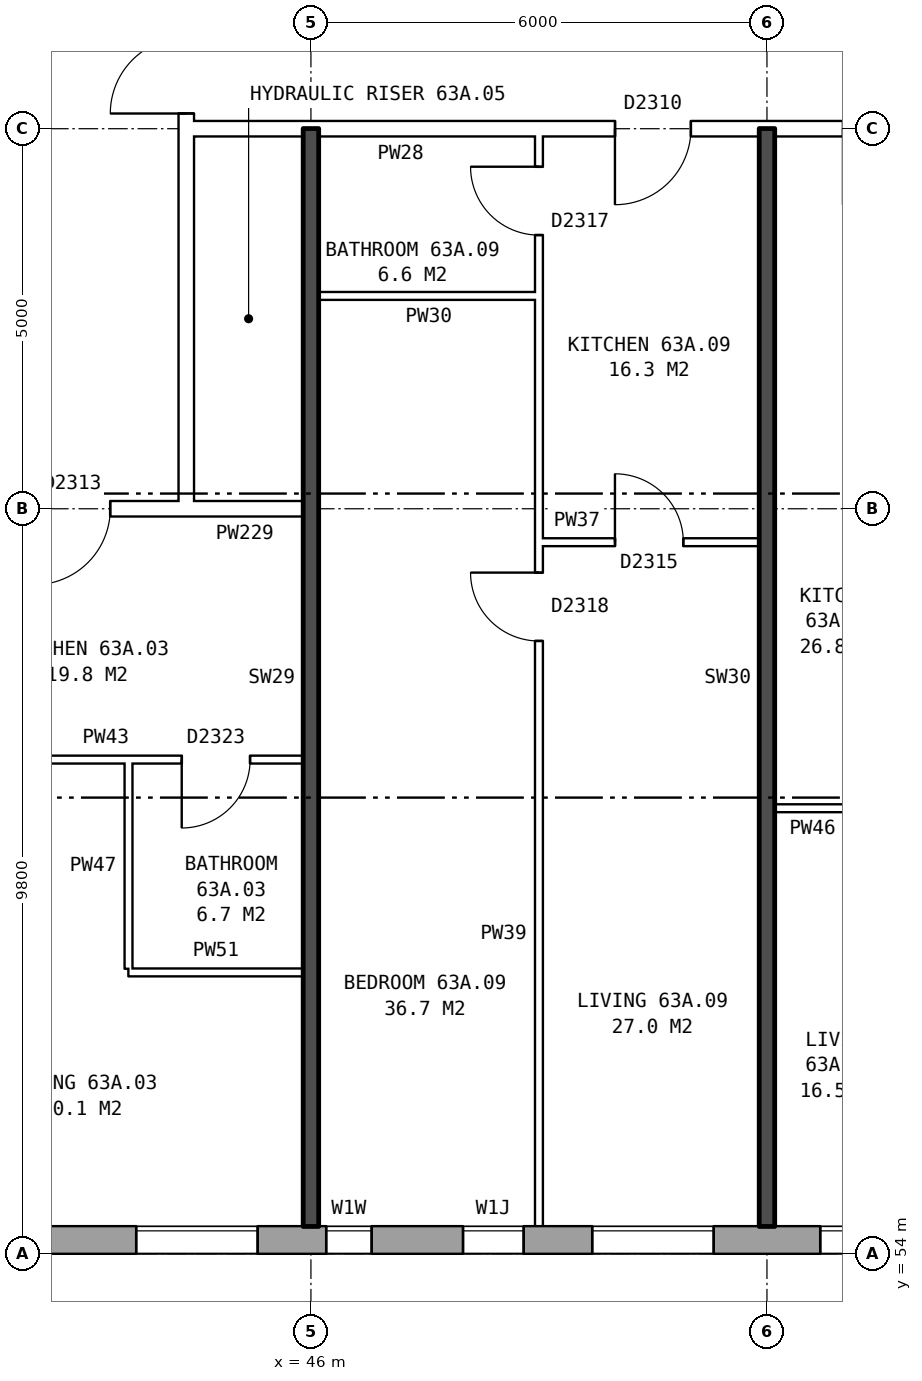
"""IFC4 building model, lengths in metres.
Left out: names, types, materials, properties, quantities, classifications, styles, units other than length and angle.
Written with IfcOpenShell. Run it as: python <this file> out.ifc"""

import sys

from ifc_helpers import new_model, si_unit, direction, frame, frame_2d, origin, place, context, subcontext, project, spatial, rectangle, extrude, element, fill, save


model = new_model("IFC4")
c1 = context("Model", 3, precision=1e-05, world=origin(), true_north=direction((0.0, 1.0)))
c2 = subcontext(c1, "Body", "Model", "MODEL_VIEW")
j1 = project(units=[si_unit("LENGTHUNIT", "METRE"), si_unit("PLANEANGLEUNIT", "RADIAN")], contexts=[c1])
p1 = place(None, origin())
s1 = spatial("IfcSite", under=j1, at=p1, CompositionType="ELEMENT")
p2 = place(p1, origin())
s2 = spatial("IfcBuilding", under=s1, at=p2, CompositionType="ELEMENT")
p3 = place(p2, frame((0.0, 0.0, 224.5)))
s3 = spatial("IfcBuildingStorey", under=s2, at=p3, CompositionType="ELEMENT", Elevation=224.5)
p4 = place(p3, frame((35.075, 54.18, 0.0), z_axis=(0.0, 0.0, 1.0), x_axis=(1.0, 0.0, 0.0)))
e1 = element("IfcWall", 1, at=p4, inside=s3, PredefinedType="STANDARD", context=c2, shape_type="SweptSolid", body=[
    extrude(rectangle(XDim=39.875, YDim=0.36, at=frame_2d((19.938, 0.0))), origin(), (0.0, 0.0, 1.0), 2.85),
])
p5 = place(p4, frame((2.625, 0.0, 0.8)))
e2 = element("IfcOpeningElement", 2, at=p5, cuts=e1, PredefinedType="OPENING", context=c2, shape_type="SweptSolid", body=[
    extrude(rectangle(XDim=1.6, YDim=1.8, at=frame_2d((0.8, 0.9))), frame((0.0, 0.19, 0.0), z_axis=(0.0, -1.0, 0.0), x_axis=(1.0, 0.0, 0.0)), (0.0, 0.0, 1.0), 0.38),
])
p6 = place(p4, frame((5.625, 0.0, 0.8)))
e3 = element("IfcOpeningElement", 3, at=p6, cuts=e1, PredefinedType="OPENING", context=c2, shape_type="SweptSolid", body=[
    extrude(rectangle(XDim=1.6, YDim=1.8, at=frame_2d((0.8, 0.9))), frame((0.0, 0.19, 0.0), z_axis=(0.0, -1.0, 0.0), x_axis=(1.0, 0.0, 0.0)), (0.0, 0.0, 1.0), 0.38),
])
p7 = place(p4, frame((8.625, 0.0, 0.8)))
e4 = element("IfcOpeningElement", 4, at=p7, cuts=e1, PredefinedType="OPENING", context=c2, shape_type="SweptSolid", body=[
    extrude(rectangle(XDim=1.6, YDim=1.8, at=frame_2d((0.8, 0.9))), frame((0.0, 0.19, 0.0), z_axis=(0.0, -1.0, 0.0), x_axis=(1.0, 0.0, 0.0)), (0.0, 0.0, 1.0), 0.38),
])
p8 = place(p4, frame((11.125, 0.0, 1.65)))
e5 = element("IfcOpeningElement", 5, at=p8, cuts=e1, PredefinedType="OPENING", context=c2, shape_type="SweptSolid", body=[
    extrude(rectangle(XDim=0.6, YDim=0.9, at=frame_2d((0.3, 0.45))), frame((0.0, 0.19, 0.0), z_axis=(0.0, -1.0, 0.0), x_axis=(1.0, 0.0, 0.0)), (0.0, 0.0, 1.0), 0.38),
])
p9 = place(p4, frame((14.625, 0.0, 0.8)))
e6 = element("IfcOpeningElement", 6, at=p9, cuts=e1, PredefinedType="OPENING", context=c2, shape_type="SweptSolid", body=[
    extrude(rectangle(XDim=1.6, YDim=1.8, at=frame_2d((0.8, 0.9))), frame((0.0, 0.19, 0.0), z_axis=(0.0, -1.0, 0.0), x_axis=(1.0, 0.0, 0.0)), (0.0, 0.0, 1.0), 0.38),
])
p10 = place(p4, frame((17.625, 0.0, 0.8)))
e7 = element("IfcOpeningElement", 7, at=p10, cuts=e1, PredefinedType="OPENING", context=c2, shape_type="SweptSolid", body=[
    extrude(rectangle(XDim=1.6, YDim=1.8, at=frame_2d((0.8, 0.9))), frame((0.0, 0.19, 0.0), z_axis=(0.0, -1.0, 0.0), x_axis=(1.0, 0.0, 0.0)), (0.0, 0.0, 1.0), 0.38),
])
p11 = place(p4, frame((20.625, 0.0, 0.8)))
e8 = element("IfcOpeningElement", 8, at=p11, cuts=e1, PredefinedType="OPENING", context=c2, shape_type="SweptSolid", body=[
    extrude(rectangle(XDim=1.6, YDim=1.8, at=frame_2d((0.8, 0.9))), frame((0.0, 0.19, 0.0), z_axis=(0.0, -1.0, 0.0), x_axis=(1.0, 0.0, 0.0)), (0.0, 0.0, 1.0), 0.38),
])
p12 = place(p4, frame((23.125, 0.0, 0.75)))
e9 = element("IfcOpeningElement", 9, at=p12, cuts=e1, PredefinedType="OPENING", context=c2, shape_type="SweptSolid", body=[
    extrude(rectangle(XDim=1.2, YDim=1.8, at=frame_2d((0.6, 0.9))), frame((0.0, 0.19, 0.0), z_axis=(0.0, -1.0, 0.0), x_axis=(1.0, 0.0, 0.0)), (0.0, 0.0, 1.0), 0.38),
])
p13 = place(p4, frame((26.625, 0.0, 0.8)))
e10 = element("IfcOpeningElement", 10, at=p13, cuts=e1, PredefinedType="OPENING", context=c2, shape_type="SweptSolid", body=[
    extrude(rectangle(XDim=1.6, YDim=1.8, at=frame_2d((0.8, 0.9))), frame((0.0, 0.19, 0.0), z_axis=(0.0, -1.0, 0.0), x_axis=(1.0, 0.0, 0.0)), (0.0, 0.0, 1.0), 0.38),
])
p14 = place(p4, frame((29.625, 0.0, 0.8)))
e11 = element("IfcOpeningElement", 11, at=p14, cuts=e1, PredefinedType="OPENING", context=c2, shape_type="SweptSolid", body=[
    extrude(rectangle(XDim=1.6, YDim=1.8, at=frame_2d((0.8, 0.9))), frame((0.0, 0.19, 0.0), z_axis=(0.0, -1.0, 0.0), x_axis=(1.0, 0.0, 0.0)), (0.0, 0.0, 1.0), 0.38),
])
p15 = place(p4, frame((32.625, 0.0, 0.8)))
e12 = element("IfcOpeningElement", 12, at=p15, cuts=e1, PredefinedType="OPENING", context=c2, shape_type="SweptSolid", body=[
    extrude(rectangle(XDim=1.6, YDim=1.8, at=frame_2d((0.8, 0.9))), frame((0.0, 0.19, 0.0), z_axis=(0.0, -1.0, 0.0), x_axis=(1.0, 0.0, 0.0)), (0.0, 0.0, 1.0), 0.38),
])
p16 = place(p4, frame((35.625, 0.0, 0.8)))
e13 = element("IfcOpeningElement", 13, at=p16, cuts=e1, PredefinedType="OPENING", context=c2, shape_type="SweptSolid", body=[
    extrude(rectangle(XDim=1.6, YDim=1.8, at=frame_2d((0.8, 0.9))), frame((0.0, 0.19, 0.0), z_axis=(0.0, -1.0, 0.0), x_axis=(1.0, 0.0, 0.0)), (0.0, 0.0, 1.0), 0.38),
])
p17 = place(p4, frame((12.925, 0.0, 0.15)))
e14 = element("IfcOpeningElement", 14, at=p17, cuts=e1, PredefinedType="OPENING", context=c2, shape_type="SweptSolid", body=[
    extrude(rectangle(XDim=0.8, YDim=1.5, at=frame_2d((0.4, 0.75))), frame((0.0, 0.19, 0.0), z_axis=(0.0, -1.0, 0.0), x_axis=(1.0, 0.0, 0.0)), (0.0, 0.0, 1.0), 0.38),
])
p18 = place(p4, frame((24.625, 0.0, 0.25)))
e15 = element("IfcOpeningElement", 15, at=p18, cuts=e1, PredefinedType="OPENING", context=c2, shape_type="SweptSolid", body=[
    extrude(rectangle(XDim=0.6, YDim=0.9, at=frame_2d((0.3, 0.45))), frame((0.0, 0.19, 0.0), z_axis=(0.0, -1.0, 0.0), x_axis=(1.0, 0.0, 0.0)), (0.0, 0.0, 1.0), 0.38),
])
p19 = place(p3, frame((44.36, 63.9, 0.0), z_axis=(0.0, 0.0, 1.0), x_axis=(0.0, 1.0, 0.0)))
e16 = element("IfcWall", 16, at=p19, inside=s3, PredefinedType="PARTITIONING", context=c2, shape_type="SweptSolid", body=[
    extrude(rectangle(XDim=12.2, YDim=0.2, at=frame_2d((6.1, 0.0))), origin(), (0.0, 0.0, 1.0), 2.85),
])
p20 = place(p19, frame((5.1, 0.0, 0.0)))
e17 = element("IfcOpeningElement", 17, at=p20, cuts=e16, PredefinedType="OPENING", context=c2, shape_type="SweptSolid", body=[
    extrude(rectangle(XDim=2.0, YDim=2.1, at=frame_2d((1.0, 1.05))), frame((0.0, 0.11, 0.0), z_axis=(0.0, -1.0, 0.0), x_axis=(1.0, 0.0, 0.0)), (0.0, 0.0, 1.0), 0.22),
])
p21 = place(p3, frame((43.6, 57.7, 0.0), z_axis=(0.0, 0.0, 1.0), x_axis=(1.0, 0.0, 0.0)))
e18 = element("IfcWall", 18, at=p21, inside=s3, PredefinedType="PARTITIONING", context=c2, shape_type="SweptSolid", body=[
    extrude(rectangle(XDim=2.3, YDim=0.1, at=frame_2d((1.15, 0.0))), origin(), (0.0, 0.0, 1.0), 2.85),
])
p22 = place(p3, frame((52.1, 59.86, 0.0), z_axis=(0.0, 0.0, 1.0), x_axis=(1.0, 0.0, 0.0)))
e19 = element("IfcWall", 19, at=p22, inside=s3, PredefinedType="PARTITIONING", context=c2, shape_type="SweptSolid", body=[
    extrude(rectangle(XDim=2.9, YDim=0.1, at=frame_2d((1.45, 0.0))), origin(), (0.0, 0.0, 1.0), 2.85),
])
p23 = place(p22, frame((1.0, 0.0, 0.0)))
e20 = element("IfcOpeningElement", 20, at=p23, cuts=e19, PredefinedType="OPENING", context=c2, shape_type="SweptSolid", body=[
    extrude(rectangle(XDim=0.9, YDim=2.1, at=frame_2d((0.45, 1.05))), frame((0.0, 0.06, 0.0), z_axis=(0.0, -1.0, 0.0), x_axis=(1.0, 0.0, 0.0)), (0.0, 0.0, 1.0), 0.12),
])
p24 = place(p3, frame((40.1, 60.5, 0.0), z_axis=(0.0, 0.0, 1.0), x_axis=(1.0, 0.0, 0.0)))
e21 = element("IfcWall", 21, at=p24, inside=s3, PredefinedType="PARTITIONING", context=c2, shape_type="SweptSolid", body=[
    extrude(rectangle(XDim=5.8, YDim=0.1, at=frame_2d((2.9, 0.0))), origin(), (0.0, 0.0, 1.0), 2.85),
])
p25 = place(p24, frame((1.3, 0.0, 0.0)))
e22 = element("IfcOpeningElement", 22, at=p25, cuts=e21, PredefinedType="OPENING", context=c2, shape_type="SweptSolid", body=[
    extrude(rectangle(XDim=0.9, YDim=2.1, at=frame_2d((0.45, 1.05))), frame((0.0, 0.06, 0.0), z_axis=(0.0, -1.0, 0.0), x_axis=(1.0, 0.0, 0.0)), (0.0, 0.0, 1.0), 0.12),
])
p26 = place(p24, frame((4.2, 0.0, 0.0)))
e23 = element("IfcOpeningElement", 23, at=p26, cuts=e21, PredefinedType="OPENING", context=c2, shape_type="SweptSolid", body=[
    extrude(rectangle(XDim=0.9, YDim=2.1, at=frame_2d((0.45, 1.05))), frame((0.0, 0.06, 0.0), z_axis=(0.0, -1.0, 0.0), x_axis=(1.0, 0.0, 0.0)), (0.0, 0.0, 1.0), 0.12),
])
p27 = place(p3, frame((49.0, 63.36, 0.0), z_axis=(0.0, 0.0, 1.0), x_axis=(1.0, 0.0, 0.0)))
e24 = element("IfcWall", 24, at=p27, inside=s3, PredefinedType="PARTITIONING", context=c2, shape_type="SweptSolid", body=[
    extrude(rectangle(XDim=2.9, YDim=0.1, at=frame_2d((1.45, 0.0))), origin(), (0.0, 0.0, 1.0), 2.85),
])
p28 = place(p27, frame((1.0, 0.0, 0.0)))
e25 = element("IfcOpeningElement", 25, at=p28, cuts=e24, PredefinedType="OPENING", context=c2, shape_type="SweptSolid", body=[
    extrude(rectangle(XDim=0.9, YDim=2.1, at=frame_2d((0.45, 1.05))), frame((0.0, 0.06, 0.0), z_axis=(0.0, -1.0, 0.0), x_axis=(1.0, 0.0, 0.0)), (0.0, 0.0, 1.0), 0.12),
])
p29 = place(p3, frame((41.36, 63.8, 0.0), z_axis=(0.0, 0.0, 1.0), x_axis=(1.0, 0.0, 0.0)))
e26 = element("IfcWall", 26, at=p29, inside=s3, PredefinedType="PARTITIONING", context=c2, shape_type="SweptSolid", body=[
    extrude(rectangle(XDim=3.0, YDim=0.2, at=frame_2d((1.5, 0.0))), origin(), (0.0, 0.0, 1.0), 2.85),
])
p30 = place(p29, frame((1.0, 0.0, 0.0)))
e27 = element("IfcOpeningElement", 27, at=p30, cuts=e26, PredefinedType="OPENING", context=c2, shape_type="SweptSolid", body=[
    extrude(rectangle(XDim=1.0, YDim=2.1, at=frame_2d((0.5, 1.05))), frame((0.0, 0.11, 0.0), z_axis=(0.0, -1.0, 0.0), x_axis=(1.0, 0.0, 0.0)), (0.0, 0.0, 1.0), 0.22),
])
p31 = place(p3, frame((44.36, 63.8, 0.0), z_axis=(0.0, 0.0, 1.0), x_axis=(1.0, 0.0, 0.0)))
e28 = element("IfcWall", 28, at=p31, inside=s3, PredefinedType="PARTITIONING", context=c2, shape_type="SweptSolid", body=[
    extrude(rectangle(XDim=1.54, YDim=0.2, at=frame_2d((0.77, 0.0))), origin(), (0.0, 0.0, 1.0), 2.85),
])
p32 = place(p3, frame((46.1, 66.6, 0.0), z_axis=(0.0, 0.0, 1.0), x_axis=(1.0, 0.0, 0.0)))
e29 = element("IfcWall", 29, at=p32, inside=s3, PredefinedType="PARTITIONING", context=c2, shape_type="SweptSolid", body=[
    extrude(rectangle(XDim=2.9, YDim=0.1, at=frame_2d((1.45, 0.0))), origin(), (0.0, 0.0, 1.0), 2.85),
])
p33 = place(p3, frame((44.36, 68.8, 0.0), z_axis=(0.0, 0.0, 1.0), x_axis=(1.0, 0.0, 0.0)))
e30 = element("IfcWall", 30, at=p33, inside=s3, PredefinedType="PARTITIONING", context=c2, shape_type="SweptSolid", body=[
    extrude(rectangle(XDim=19.28, YDim=0.2, at=frame_2d((9.64, 0.0))), origin(), (0.0, 0.0, 1.0), 2.85),
])
p34 = place(p33, frame((14.64, 0.0, 0.0)))
e31 = element("IfcOpeningElement", 31, at=p34, cuts=e30, PredefinedType="OPENING", context=c2, shape_type="SweptSolid", body=[
    extrude(rectangle(XDim=1.0, YDim=2.1, at=frame_2d((0.5, 1.05))), frame((0.0, 0.11, 0.0), z_axis=(0.0, -1.0, 0.0), x_axis=(1.0, 0.0, 0.0)), (0.0, 0.0, 1.0), 0.22),
])
p35 = place(p33, frame((8.64, 0.0, 0.0)))
e32 = element("IfcOpeningElement", 32, at=p35, cuts=e30, PredefinedType="OPENING", context=c2, shape_type="SweptSolid", body=[
    extrude(rectangle(XDim=1.0, YDim=2.1, at=frame_2d((0.5, 1.05))), frame((0.0, 0.11, 0.0), z_axis=(0.0, -1.0, 0.0), x_axis=(1.0, 0.0, 0.0)), (0.0, 0.0, 1.0), 0.22),
])
p36 = place(p33, frame((5.64, 0.0, 0.0)))
e33 = element("IfcOpeningElement", 33, at=p36, cuts=e30, PredefinedType="OPENING", context=c2, shape_type="SweptSolid", body=[
    extrude(rectangle(XDim=1.0, YDim=2.1, at=frame_2d((0.5, 1.05))), frame((0.0, 0.11, 0.0), z_axis=(0.0, -1.0, 0.0), x_axis=(1.0, 0.0, 0.0)), (0.0, 0.0, 1.0), 0.22),
])
p37 = place(p3, frame((43.6, 57.75, 0.0), z_axis=(0.0, 0.0, 1.0), x_axis=(0.0, 1.0, 0.0)))
e34 = element("IfcWall", 34, at=p37, inside=s3, PredefinedType="PARTITIONING", context=c2, shape_type="SweptSolid", body=[
    extrude(rectangle(XDim=2.7, YDim=0.1, at=frame_2d((1.35, 0.0))), origin(), (0.0, 0.0, 1.0), 2.85),
])
p38 = place(p3, frame((46.0, 54.36, 0.0), z_axis=(0.0, 0.0, 1.0), x_axis=(0.0, 1.0, 0.0)))
e35 = element("IfcWall", 35, at=p38, inside=s3, PredefinedType="SOLIDWALL", context=c2, shape_type="SweptSolid", body=[
    extrude(rectangle(XDim=14.44, YDim=0.2, at=frame_2d((7.22, 0.0))), origin(), (0.0, 0.0, 1.0), 2.85),
])
p39 = place(p3, frame((49.0, 54.36, 0.0), z_axis=(0.0, 0.0, 1.0), x_axis=(0.0, 1.0, 0.0)))
e36 = element("IfcWall", 36, at=p39, inside=s3, PredefinedType="PARTITIONING", context=c2, shape_type="SweptSolid", body=[
    extrude(rectangle(XDim=14.34, YDim=0.1, at=frame_2d((7.17, 0.0))), origin(), (0.0, 0.0, 1.0), 2.85),
])
p40 = place(p39, frame((7.7, 0.0, 0.0)))
e37 = element("IfcOpeningElement", 37, at=p40, cuts=e36, PredefinedType="OPENING", context=c2, shape_type="SweptSolid", body=[
    extrude(rectangle(XDim=0.9, YDim=2.1, at=frame_2d((0.45, 1.05))), frame((0.0, 0.06, 0.0), z_axis=(0.0, -1.0, 0.0), x_axis=(1.0, 0.0, 0.0)), (0.0, 0.0, 1.0), 0.12),
])
p41 = place(p39, frame((13.04, 0.0, 0.0)))
e38 = element("IfcOpeningElement", 38, at=p41, cuts=e36, PredefinedType="OPENING", context=c2, shape_type="SweptSolid", body=[
    extrude(rectangle(XDim=0.9, YDim=2.1, at=frame_2d((0.45, 1.05))), frame((0.0, 0.06, 0.0), z_axis=(0.0, -1.0, 0.0), x_axis=(1.0, 0.0, 0.0)), (0.0, 0.0, 1.0), 0.12),
])
p42 = place(p3, frame((52.0, 54.36, 0.0), z_axis=(0.0, 0.0, 1.0), x_axis=(0.0, 1.0, 0.0)))
e39 = element("IfcWall", 39, at=p42, inside=s3, PredefinedType="SOLIDWALL", context=c2, shape_type="SweptSolid", body=[
    extrude(rectangle(XDim=14.44, YDim=0.2, at=frame_2d((7.22, 0.0))), origin(), (0.0, 0.0, 1.0), 2.85),
])
p43 = place(p7, origin())
e40 = element("IfcWindow", 40, at=p43, inside=s3, PartitioningType="SINGLE_PANEL", PredefinedType="WINDOW", context=c2, shape_type="SweptSolid", body=[
    extrude(rectangle(XDim=1.6, YDim=1.8, at=frame_2d((0.8, 0.9))), frame((0.0, 0.15, 0.0), z_axis=(0.0, -1.0, 0.0), x_axis=(1.0, 0.0, 0.0)), (0.0, 0.0, 1.0), 0.06),
])
fill(e4, e40)
p44 = place(p8, origin())
e41 = element("IfcWindow", 41, at=p44, inside=s3, PartitioningType="SINGLE_PANEL", PredefinedType="WINDOW", context=c2, shape_type="SweptSolid", body=[
    extrude(rectangle(XDim=0.6, YDim=0.9, at=frame_2d((0.3, 0.45))), frame((0.0, 0.15, 0.0), z_axis=(0.0, -1.0, 0.0), x_axis=(1.0, 0.0, 0.0)), (0.0, 0.0, 1.0), 0.06),
])
fill(e5, e41)
p45 = place(p9, origin())
e42 = element("IfcWindow", 42, at=p45, inside=s3, PartitioningType="SINGLE_PANEL", PredefinedType="WINDOW", context=c2, shape_type="SweptSolid", body=[
    extrude(rectangle(XDim=1.6, YDim=1.8, at=frame_2d((0.8, 0.9))), frame((0.0, 0.15, 0.0), z_axis=(0.0, -1.0, 0.0), x_axis=(1.0, 0.0, 0.0)), (0.0, 0.0, 1.0), 0.06),
])
fill(e6, e42)
p46 = place(p10, origin())
e43 = element("IfcWindow", 43, at=p46, inside=s3, PartitioningType="SINGLE_PANEL", PredefinedType="WINDOW", context=c2, shape_type="SweptSolid", body=[
    extrude(rectangle(XDim=1.6, YDim=1.8, at=frame_2d((0.8, 0.9))), frame((0.0, 0.15, 0.0), z_axis=(0.0, -1.0, 0.0), x_axis=(1.0, 0.0, 0.0)), (0.0, 0.0, 1.0), 0.06),
])
fill(e7, e43)
p47 = place(p20, origin())
e44 = element("IfcDoor", 44, at=p47, inside=s3, OperationType="DOUBLE_DOOR_SINGLE_SWING", PredefinedType="DOOR", context=c2, shape_type="SweptSolid", body=[
    extrude(rectangle(XDim=2.0, YDim=2.1, at=frame_2d((1.0, 1.05))), frame((0.0, 0.025, 0.0), z_axis=(0.0, -1.0, 0.0), x_axis=(1.0, 0.0, 0.0)), (0.0, 0.0, 1.0), 0.05),
])
fill(e17, e44)
p48 = place(p30, frame((1.0, 0.0, 0.0), z_axis=(0.0, 0.0, 1.0), x_axis=(-1.0, 0.0, 0.0)))
e45 = element("IfcDoor", 45, at=p48, inside=s3, OperationType="SINGLE_SWING_RIGHT", PredefinedType="DOOR", context=c2, shape_type="SweptSolid", body=[
    extrude(rectangle(XDim=1.0, YDim=2.1, at=frame_2d((0.5, 1.05))), frame((0.0, 0.025, 0.0), z_axis=(0.0, -1.0, 0.0), x_axis=(1.0, 0.0, 0.0)), (0.0, 0.0, 1.0), 0.05),
])
fill(e27, e45)
p49 = place(p26, frame((0.9, 0.0, 0.0), z_axis=(0.0, 0.0, 1.0), x_axis=(-1.0, 0.0, 0.0)))
e46 = element("IfcDoor", 46, at=p49, inside=s3, OperationType="SINGLE_SWING_RIGHT", PredefinedType="DOOR", context=c2, shape_type="SweptSolid", body=[
    extrude(rectangle(XDim=0.9, YDim=2.1, at=frame_2d((0.45, 1.05))), frame((0.0, 0.025, 0.0), z_axis=(0.0, -1.0, 0.0), x_axis=(1.0, 0.0, 0.0)), (0.0, 0.0, 1.0), 0.05),
])
fill(e23, e46)
p50 = place(p40, origin())
e47 = element("IfcDoor", 47, at=p50, inside=s3, OperationType="SINGLE_SWING_RIGHT", PredefinedType="DOOR", context=c2, shape_type="SweptSolid", body=[
    extrude(rectangle(XDim=0.9, YDim=2.1, at=frame_2d((0.45, 1.05))), frame((0.0, 0.025, 0.0), z_axis=(0.0, -1.0, 0.0), x_axis=(1.0, 0.0, 0.0)), (0.0, 0.0, 1.0), 0.05),
])
fill(e37, e47)
p51 = place(p36, frame((1.0, 0.0, 0.0), z_axis=(0.0, 0.0, 1.0), x_axis=(-1.0, 0.0, 0.0)))
e48 = element("IfcDoor", 48, at=p51, inside=s3, OperationType="SINGLE_SWING_RIGHT", PredefinedType="DOOR", context=c2, shape_type="SweptSolid", body=[
    extrude(rectangle(XDim=1.0, YDim=2.1, at=frame_2d((0.5, 1.05))), frame((0.0, 0.025, 0.0), z_axis=(0.0, -1.0, 0.0), x_axis=(1.0, 0.0, 0.0)), (0.0, 0.0, 1.0), 0.05),
])
fill(e33, e48)
p52 = place(p28, origin())
e49 = element("IfcDoor", 49, at=p52, inside=s3, OperationType="SINGLE_SWING_LEFT", PredefinedType="DOOR", context=c2, shape_type="SweptSolid", body=[
    extrude(rectangle(XDim=0.9, YDim=2.1, at=frame_2d((0.45, 1.05))), frame((0.0, 0.025, 0.0), z_axis=(0.0, -1.0, 0.0), x_axis=(1.0, 0.0, 0.0)), (0.0, 0.0, 1.0), 0.05),
])
fill(e25, e49)
p53 = place(p41, origin())
e50 = element("IfcDoor", 50, at=p53, inside=s3, OperationType="SINGLE_SWING_RIGHT", PredefinedType="DOOR", context=c2, shape_type="SweptSolid", body=[
    extrude(rectangle(XDim=0.9, YDim=2.1, at=frame_2d((0.45, 1.05))), frame((0.0, 0.025, 0.0), z_axis=(0.0, -1.0, 0.0), x_axis=(1.0, 0.0, 0.0)), (0.0, 0.0, 1.0), 0.05),
])
fill(e38, e50)
p54 = place(p17, origin())
e51 = element("IfcWindow", 51, at=p54, inside=s3, PartitioningType="SINGLE_PANEL", PredefinedType="WINDOW", context=c2, shape_type="SweptSolid", body=[
    extrude(rectangle(XDim=0.8, YDim=1.5, at=frame_2d((0.4, 0.75))), frame((0.0, 0.15, 0.0), z_axis=(0.0, -1.0, 0.0), x_axis=(1.0, 0.0, 0.0)), (0.0, 0.0, 1.0), 0.06),
])
fill(e14, e51)
save(model, sys.argv[1])
